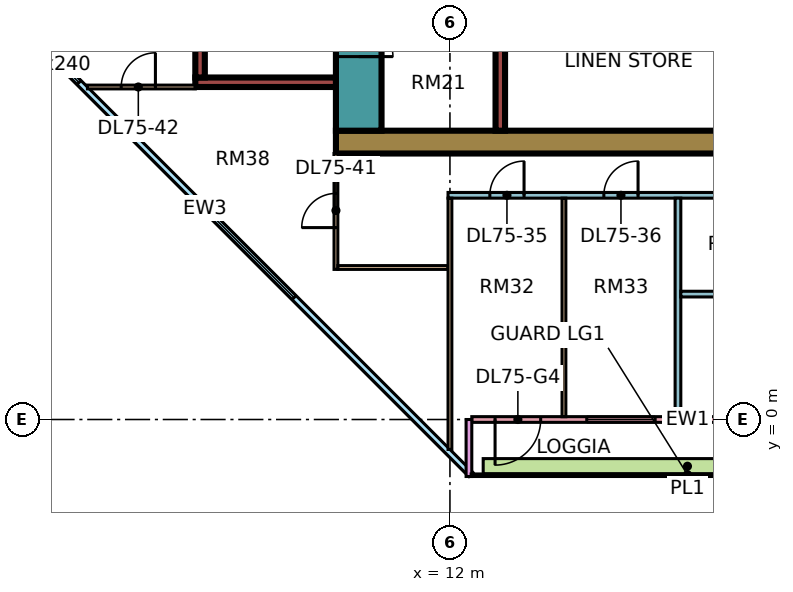
"""IFC4 building model, lengths in metres.
Left out: names, types, materials, properties, quantities, classifications, styles, units other than length and angle.
Written with IfcOpenShell. Run it as: python <this file> out.ifc"""

import sys

from ifc_helpers import new_model, si_unit, direction, frame, frame_2d, origin, place, context, subcontext, project, spatial, rectangle, extrude, element, fill, save


model = new_model("IFC4")
c1 = context("Model", 3, precision=1e-05, world=origin(), true_north=direction((0.0, 1.0)))
c2 = subcontext(c1, "Body", "Model", "MODEL_VIEW")
j1 = project(units=[si_unit("LENGTHUNIT", "METRE"), si_unit("PLANEANGLEUNIT", "RADIAN")], contexts=[c1])
p1 = place(None, origin())
s1 = spatial("IfcSite", under=j1, at=p1, CompositionType="ELEMENT")
p2 = place(p1, origin())
s2 = spatial("IfcBuilding", under=s1, at=p2, CompositionType="ELEMENT")
p3 = place(p2, frame((0.0, 0.0, 318.4)))
s3 = spatial("IfcBuildingStorey", under=s2, at=p3, CompositionType="ELEMENT", Elevation=318.4)
p4 = place(p3, frame((9.0, 7.3, 0.0), z_axis=(0.0, 0.0, 1.0), x_axis=(1.0, 0.0, 0.0)))
e1 = element("IfcWall", 1, at=p4, inside=s3, PredefinedType="SHEAR", context=c2, shape_type="SweptSolid", body=[
    extrude(rectangle(XDim=25.0, YDim=0.6, at=frame_2d((12.5, 0.0))), origin(), (0.0, 0.0, 1.0), 3.75),
])
p5 = place(p3, frame((9.6, 7.6, 0.0), z_axis=(0.0, 0.0, 1.0), x_axis=(0.0, 1.0, 0.0)))
e2 = element("IfcWall", 2, at=p5, inside=s3, PredefinedType="SHEAR", context=c2, shape_type="SweptSolid", body=[
    extrude(rectangle(XDim=11.8, YDim=1.2, at=frame_2d((5.9, 0.0))), origin(), (0.0, 0.0, 1.0), 3.75),
])
p6 = place(p5, frame((4.275, 0.0, 0.0)))
e3 = element("IfcOpeningElement", 3, at=p6, cuts=e2, PredefinedType="OPENING", context=c2, shape_type="SweptSolid", body=[
    extrude(rectangle(XDim=1.1, YDim=2.2, at=frame_2d((0.55, 1.1))), frame((0.0, 0.61, 0.0), z_axis=(0.0, -1.0, 0.0), x_axis=(1.0, 0.0, 0.0)), (0.0, 0.0, 1.0), 1.22),
])
p7 = place(p5, frame((6.775, 0.0, 0.0)))
e4 = element("IfcOpeningElement", 4, at=p7, cuts=e2, PredefinedType="OPENING", context=c2, shape_type="SweptSolid", body=[
    extrude(rectangle(XDim=1.1, YDim=2.2, at=frame_2d((0.55, 1.1))), frame((0.0, 0.61, 0.0), z_axis=(0.0, -1.0, 0.0), x_axis=(1.0, 0.0, 0.0)), (0.0, 0.0, 1.0), 1.22),
])
p8 = place(p5, frame((9.7, 0.0, 0.0)))
e5 = element("IfcOpeningElement", 5, at=p8, cuts=e2, PredefinedType="OPENING", context=c2, shape_type="SweptSolid", body=[
    extrude(rectangle(XDim=1.1, YDim=2.2, at=frame_2d((0.55, 1.1))), frame((0.0, 0.61, 0.0), z_axis=(0.0, -1.0, 0.0), x_axis=(1.0, 0.0, 0.0)), (0.0, 0.0, 1.0), 1.22),
])
p9 = place(p5, frame((1.95, 0.0, 0.0)))
e6 = element("IfcOpeningElement", 6, at=p9, cuts=e2, PredefinedType="OPENING", context=c2, shape_type="SweptSolid", body=[
    extrude(rectangle(XDim=0.9, YDim=2.1, at=frame_2d((0.45, 1.05))), frame((0.0, 0.61, 0.0), z_axis=(0.0, -1.0, 0.0), x_axis=(1.0, 0.0, 0.0)), (0.0, 0.0, 1.0), 1.22),
])
p10 = place(p3, frame((13.325, 7.6, 0.0), z_axis=(0.0, 0.0, 1.0), x_axis=(0.0, 1.0, 0.0)))
e7 = element("IfcWall", 7, at=p10, inside=s3, PredefinedType="SHEAR", context=c2, shape_type="SweptSolid", body=[
    extrude(rectangle(XDim=11.8, YDim=0.25, at=frame_2d((5.9, 0.0))), origin(), (0.0, 0.0, 1.0), 3.75),
])
p11 = place(p3, frame((5.3, 8.875, 0.0), z_axis=(0.0, 0.0, 1.0), x_axis=(1.0, 0.0, 0.0)))
e8 = element("IfcWall", 8, at=p11, inside=s3, PredefinedType="SHEAR", context=c2, shape_type="SweptSolid", body=[
    extrude(rectangle(XDim=3.7, YDim=0.25, at=frame_2d((1.85, 0.0))), origin(), (0.0, 0.0, 1.0), 3.75),
])
p12 = place(p3, frame((5.425, 9.0, 0.0), z_axis=(0.0, 0.0, 1.0), x_axis=(0.0, 1.0, 0.0)))
e9 = element("IfcWall", 9, at=p12, inside=s3, PredefinedType="SHEAR", context=c2, shape_type="SweptSolid", body=[
    extrude(rectangle(XDim=4.0, YDim=0.25, at=frame_2d((2.0, 0.0))), origin(), (0.0, 0.0, 1.0), 3.75),
])
p13 = place(p3, frame((-1.447, 12.553, 0.0), z_axis=(0.0, 0.0, 1.0), x_axis=(0.707106781187, -0.707106781187, 0.0)))
e10 = element("IfcWall", 10, at=p13, inside=s3, PredefinedType="SOLIDWALL", context=c2, shape_type="SweptSolid", body=[
    extrude(rectangle(XDim=19.799, YDim=0.15, at=frame_2d((9.899, 0.0))), origin(), (0.0, 0.0, 1.0), 3.3),
])
p14 = place(p13, frame((2.212, 0.0, 0.45)))
e11 = element("IfcOpeningElement", 11, at=p14, cuts=e10, PredefinedType="OPENING", context=c2, shape_type="SweptSolid", body=[
    extrude(rectangle(XDim=3.0, YDim=2.4, at=frame_2d((1.5, 1.2))), frame((0.0, 0.085, 0.0), z_axis=(0.0, -1.0, 0.0), x_axis=(1.0, 0.0, 0.0)), (0.0, 0.0, 1.0), 0.17),
])
p15 = place(p13, frame((10.216, 0.0, 0.45)))
e12 = element("IfcOpeningElement", 12, at=p15, cuts=e10, PredefinedType="OPENING", context=c2, shape_type="SweptSolid", body=[
    extrude(rectangle(XDim=3.0, YDim=2.4, at=frame_2d((1.5, 1.2))), frame((0.0, 0.085, 0.0), z_axis=(0.0, -1.0, 0.0), x_axis=(1.0, 0.0, 0.0)), (0.0, 0.0, 1.0), 0.17),
])
p16 = place(p3, frame((12.575, 0.0, 0.0), z_axis=(0.0, 0.0, 1.0), x_axis=(1.0, 0.0, 0.0)))
e13 = element("IfcWall", 13, at=p16, inside=s3, PredefinedType="SOLIDWALL", context=c2, shape_type="SweptSolid", body=[
    extrude(rectangle(XDim=11.35, YDim=0.15, at=frame_2d((5.675, 0.0))), origin(), (0.0, 0.0, 1.0), 3.3),
])
p17 = place(p16, frame((0.613, 0.0, 0.0)))
e14 = element("IfcOpeningElement", 14, at=p17, cuts=e13, PredefinedType="OPENING", context=c2, shape_type="SweptSolid", body=[
    extrude(rectangle(XDim=1.2, YDim=2.4, at=frame_2d((0.6, 1.2))), frame((0.0, 0.085, 0.0), z_axis=(0.0, -1.0, 0.0), x_axis=(1.0, 0.0, 0.0)), (0.0, 0.0, 1.0), 0.17),
])
p18 = place(p16, frame((3.025, 0.0, 0.45)))
e15 = element("IfcOpeningElement", 15, at=p18, cuts=e13, PredefinedType="OPENING", context=c2, shape_type="SweptSolid", body=[
    extrude(rectangle(XDim=1.8, YDim=2.4, at=frame_2d((0.9, 1.2))), frame((0.0, 0.085, 0.0), z_axis=(0.0, -1.0, 0.0), x_axis=(1.0, 0.0, 0.0)), (0.0, 0.0, 1.0), 0.17),
])
p19 = place(p16, frame((6.675, 0.0, 0.45)))
e16 = element("IfcOpeningElement", 16, at=p19, cuts=e13, PredefinedType="OPENING", context=c2, shape_type="SweptSolid", body=[
    extrude(rectangle(XDim=3.0, YDim=2.4, at=frame_2d((1.5, 1.2))), frame((0.0, 0.085, 0.0), z_axis=(0.0, -1.0, 0.0), x_axis=(1.0, 0.0, 0.0)), (0.0, 0.0, 1.0), 0.17),
])
p20 = place(p3, frame((12.5, -1.5, 0.0), z_axis=(0.0, 0.0, 1.0), x_axis=(0.0, 1.0, 0.0)))
e17 = element("IfcWall", 17, at=p20, inside=s3, PredefinedType="SOLIDWALL", context=c2, shape_type="SweptSolid", body=[
    extrude(rectangle(XDim=1.5, YDim=0.15, at=frame_2d((0.75, 0.0))), origin(), (0.0, 0.0, 1.0), 3.3),
])
p21 = place(p3, frame((12.875, -1.229, 0.0), z_axis=(0.0, 0.0, 1.0), x_axis=(1.0, 0.0, 0.0)))
e18 = element("IfcWall", 18, at=p21, inside=s3, PredefinedType="SOLIDWALL", context=c2, shape_type="SweptSolid", body=[
    extrude(rectangle(XDim=10.75, YDim=0.4, at=frame_2d((5.375, 0.0))), origin(), (0.0, 0.0, 1.0), 0.7),
])
p22 = place(p3, frame((2.461, 8.75, 0.0), z_axis=(0.0, 0.0, 1.0), x_axis=(1.0, 0.0, 0.0)))
e19 = element("IfcWall", 19, at=p22, inside=s3, PredefinedType="PARTITIONING", context=c2, shape_type="SweptSolid", body=[
    extrude(rectangle(XDim=2.839, YDim=0.1, at=frame_2d((1.419, 0.0))), origin(), (0.0, 0.0, 1.0), 3.3),
])
p23 = place(p22, frame((0.889, 0.0, 0.0)))
e20 = element("IfcOpeningElement", 20, at=p23, cuts=e19, PredefinedType="OPENING", context=c2, shape_type="SweptSolid", body=[
    extrude(rectangle(XDim=0.9, YDim=2.1, at=frame_2d((0.45, 1.05))), frame((0.0, 0.06, 0.0), z_axis=(0.0, -1.0, 0.0), x_axis=(1.0, 0.0, 0.0)), (0.0, 0.0, 1.0), 0.12),
])
p24 = place(p3, frame((9.0, 3.95, 0.0), z_axis=(0.0, 0.0, 1.0), x_axis=(0.0, 1.0, 0.0)))
e21 = element("IfcWall", 21, at=p24, inside=s3, PredefinedType="PARTITIONING", context=c2, shape_type="SweptSolid", body=[
    extrude(rectangle(XDim=3.05, YDim=0.1, at=frame_2d((1.525, 0.0))), origin(), (0.0, 0.0, 1.0), 3.3),
])
p25 = place(p24, frame((1.1, 0.0, 0.0)))
e22 = element("IfcOpeningElement", 22, at=p25, cuts=e21, PredefinedType="OPENING", context=c2, shape_type="SweptSolid", body=[
    extrude(rectangle(XDim=0.9, YDim=2.1, at=frame_2d((0.45, 1.05))), frame((0.0, 0.06, 0.0), z_axis=(0.0, -1.0, 0.0), x_axis=(1.0, 0.0, 0.0)), (0.0, 0.0, 1.0), 0.12),
])
p26 = place(p3, frame((9.05, 4.0, 0.0), z_axis=(0.0, 0.0, 1.0), x_axis=(1.0, 0.0, 0.0)))
e23 = element("IfcWall", 23, at=p26, inside=s3, PredefinedType="PARTITIONING", context=c2, shape_type="SweptSolid", body=[
    extrude(rectangle(XDim=2.9, YDim=0.1, at=frame_2d((1.45, 0.0))), origin(), (0.0, 0.0, 1.0), 3.3),
])
p27 = place(p3, frame((11.95, 5.9, 0.0), z_axis=(0.0, 0.0, 1.0), x_axis=(1.0, 0.0, 0.0)))
e24 = element("IfcWall", 24, at=p27, inside=s3, PredefinedType="PARTITIONING", context=c2, shape_type="SweptSolid", body=[
    extrude(rectangle(XDim=21.1, YDim=0.15, at=frame_2d((10.55, 0.0))), origin(), (0.0, 0.0, 1.0), 3.3),
])
p28 = place(p27, frame((1.1, 0.0, 0.0)))
e25 = element("IfcOpeningElement", 25, at=p28, cuts=e24, PredefinedType="OPENING", context=c2, shape_type="SweptSolid", body=[
    extrude(rectangle(XDim=0.9, YDim=2.1, at=frame_2d((0.45, 1.05))), frame((0.0, 0.085, 0.0), z_axis=(0.0, -1.0, 0.0), x_axis=(1.0, 0.0, 0.0)), (0.0, 0.0, 1.0), 0.17),
])
p29 = place(p27, frame((4.1, 0.0, 0.0)))
e26 = element("IfcOpeningElement", 26, at=p29, cuts=e24, PredefinedType="OPENING", context=c2, shape_type="SweptSolid", body=[
    extrude(rectangle(XDim=0.9, YDim=2.1, at=frame_2d((0.45, 1.05))), frame((0.0, 0.085, 0.0), z_axis=(0.0, -1.0, 0.0), x_axis=(1.0, 0.0, 0.0)), (0.0, 0.0, 1.0), 0.17),
])
p30 = place(p27, frame((10.1, 0.0, 0.0)))
e27 = element("IfcOpeningElement", 27, at=p30, cuts=e24, PredefinedType="OPENING", context=c2, shape_type="SweptSolid", body=[
    extrude(rectangle(XDim=0.9, YDim=2.1, at=frame_2d((0.45, 1.05))), frame((0.0, 0.085, 0.0), z_axis=(0.0, -1.0, 0.0), x_axis=(1.0, 0.0, 0.0)), (0.0, 0.0, 1.0), 0.17),
])
p31 = place(p27, frame((16.1, 0.0, 0.0)))
e28 = element("IfcOpeningElement", 28, at=p31, cuts=e24, PredefinedType="OPENING", context=c2, shape_type="SweptSolid", body=[
    extrude(rectangle(XDim=0.9, YDim=2.1, at=frame_2d((0.45, 1.05))), frame((0.0, 0.085, 0.0), z_axis=(0.0, -1.0, 0.0), x_axis=(1.0, 0.0, 0.0)), (0.0, 0.0, 1.0), 0.17),
])
p32 = place(p3, frame((12.0, -0.788, 0.0), z_axis=(0.0, 0.0, 1.0), x_axis=(0.0, 1.0, 0.0)))
e29 = element("IfcWall", 29, at=p32, inside=s3, PredefinedType="PARTITIONING", context=c2, shape_type="SweptSolid", body=[
    extrude(rectangle(XDim=6.613, YDim=0.1, at=frame_2d((3.306, 0.0))), origin(), (0.0, 0.0, 1.0), 3.3),
])
p33 = place(p3, frame((15.0, 0.074, 0.0), z_axis=(0.0, 0.0, 1.0), x_axis=(0.0, 1.0, 0.0)))
e30 = element("IfcWall", 30, at=p33, inside=s3, PredefinedType="PARTITIONING", context=c2, shape_type="SweptSolid", body=[
    extrude(rectangle(XDim=5.751, YDim=0.1, at=frame_2d((2.875, 0.0))), origin(), (0.0, 0.0, 1.0), 3.3),
])
p34 = place(p3, frame((18.0, 0.074, 0.0), z_axis=(0.0, 0.0, 1.0), x_axis=(0.0, 1.0, 0.0)))
e31 = element("IfcWall", 31, at=p34, inside=s3, PredefinedType="PARTITIONING", context=c2, shape_type="SweptSolid", body=[
    extrude(rectangle(XDim=5.751, YDim=0.15, at=frame_2d((2.875, 0.0))), origin(), (0.0, 0.0, 1.0), 3.3),
])
p35 = place(p3, frame((18.075, 3.3, 0.0), z_axis=(0.0, 0.0, 1.0), x_axis=(1.0, 0.0, 0.0)))
e32 = element("IfcWall", 32, at=p35, inside=s3, PredefinedType="PARTITIONING", context=c2, shape_type="SweptSolid", body=[
    extrude(rectangle(XDim=3.0, YDim=0.15, at=frame_2d((1.5, 0.0))), origin(), (0.0, 0.0, 1.0), 3.3),
])
p36 = place(p14, origin())
e33 = element("IfcWindow", 33, at=p36, inside=s3, PartitioningType="SINGLE_PANEL", PredefinedType="WINDOW", context=c2, shape_type="SweptSolid", body=[
    extrude(rectangle(XDim=3.0, YDim=2.4, at=frame_2d((1.5, 1.2))), frame((0.0, 0.03, 0.0), z_axis=(0.0, -1.0, 0.0), x_axis=(1.0, 0.0, 0.0)), (0.0, 0.0, 1.0), 0.06),
])
fill(e11, e33)
p37 = place(p15, origin())
e34 = element("IfcWindow", 34, at=p37, inside=s3, PartitioningType="SINGLE_PANEL", PredefinedType="WINDOW", context=c2, shape_type="SweptSolid", body=[
    extrude(rectangle(XDim=3.0, YDim=2.4, at=frame_2d((1.5, 1.2))), frame((0.0, 0.03, 0.0), z_axis=(0.0, -1.0, 0.0), x_axis=(1.0, 0.0, 0.0)), (0.0, 0.0, 1.0), 0.06),
])
fill(e12, e34)
p38 = place(p17, frame((1.2, 0.0, 0.0), z_axis=(0.0, 0.0, 1.0), x_axis=(-1.0, 0.0, 0.0)))
e35 = element("IfcDoor", 35, at=p38, inside=s3, OperationType="DOUBLE_DOOR_SINGLE_SWING", PredefinedType="DOOR", context=c2, shape_type="SweptSolid", body=[
    extrude(rectangle(XDim=1.2, YDim=2.4, at=frame_2d((0.6, 1.2))), frame((0.0, 0.025, 0.0), z_axis=(0.0, -1.0, 0.0), x_axis=(1.0, 0.0, 0.0)), (0.0, 0.0, 1.0), 0.05),
])
fill(e14, e35)
p39 = place(p18, origin())
e36 = element("IfcWindow", 36, at=p39, inside=s3, PartitioningType="SINGLE_PANEL", PredefinedType="WINDOW", context=c2, shape_type="SweptSolid", body=[
    extrude(rectangle(XDim=1.8, YDim=2.4, at=frame_2d((0.9, 1.2))), frame((0.0, 0.03, 0.0), z_axis=(0.0, -1.0, 0.0), x_axis=(1.0, 0.0, 0.0)), (0.0, 0.0, 1.0), 0.06),
])
fill(e15, e36)
p40 = place(p9, frame((0.9, 0.0, 0.0), z_axis=(0.0, 0.0, 1.0), x_axis=(-1.0, 0.0, 0.0)))
e37 = element("IfcDoor", 37, at=p40, inside=s3, OperationType="SINGLE_SWING_LEFT", PredefinedType="DOOR", context=c2, shape_type="SweptSolid", body=[
    extrude(rectangle(XDim=0.9, YDim=2.1, at=frame_2d((0.45, 1.05))), frame((0.0, 0.025, 0.0), z_axis=(0.0, -1.0, 0.0), x_axis=(1.0, 0.0, 0.0)), (0.0, 0.0, 1.0), 0.05),
])
fill(e6, e37)
p41 = place(p28, frame((0.9, 0.0, 0.0), z_axis=(0.0, 0.0, 1.0), x_axis=(-1.0, 0.0, 0.0)))
e38 = element("IfcDoor", 38, at=p41, inside=s3, OperationType="SINGLE_SWING_RIGHT", PredefinedType="DOOR", context=c2, shape_type="SweptSolid", body=[
    extrude(rectangle(XDim=0.9, YDim=2.1, at=frame_2d((0.45, 1.05))), frame((0.0, 0.025, 0.0), z_axis=(0.0, -1.0, 0.0), x_axis=(1.0, 0.0, 0.0)), (0.0, 0.0, 1.0), 0.05),
])
fill(e25, e38)
p42 = place(p29, frame((0.9, 0.0, 0.0), z_axis=(0.0, 0.0, 1.0), x_axis=(-1.0, 0.0, 0.0)))
e39 = element("IfcDoor", 39, at=p42, inside=s3, OperationType="SINGLE_SWING_RIGHT", PredefinedType="DOOR", context=c2, shape_type="SweptSolid", body=[
    extrude(rectangle(XDim=0.9, YDim=2.1, at=frame_2d((0.45, 1.05))), frame((0.0, 0.025, 0.0), z_axis=(0.0, -1.0, 0.0), x_axis=(1.0, 0.0, 0.0)), (0.0, 0.0, 1.0), 0.05),
])
fill(e26, e39)
p43 = place(p25, origin())
e40 = element("IfcDoor", 40, at=p43, inside=s3, OperationType="SINGLE_SWING_LEFT", PredefinedType="DOOR", context=c2, shape_type="SweptSolid", body=[
    extrude(rectangle(XDim=0.9, YDim=2.1, at=frame_2d((0.45, 1.05))), frame((0.0, 0.025, 0.0), z_axis=(0.0, -1.0, 0.0), x_axis=(1.0, 0.0, 0.0)), (0.0, 0.0, 1.0), 0.05),
])
fill(e22, e40)
p44 = place(p23, frame((0.9, 0.0, 0.0), z_axis=(0.0, 0.0, 1.0), x_axis=(-1.0, 0.0, 0.0)))
e41 = element("IfcDoor", 41, at=p44, inside=s3, OperationType="SINGLE_SWING_RIGHT", PredefinedType="DOOR", context=c2, shape_type="SweptSolid", body=[
    extrude(rectangle(XDim=0.9, YDim=2.1, at=frame_2d((0.45, 1.05))), frame((0.0, 0.025, 0.0), z_axis=(0.0, -1.0, 0.0), x_axis=(1.0, 0.0, 0.0)), (0.0, 0.0, 1.0), 0.05),
])
fill(e20, e41)
save(model, sys.argv[1])
